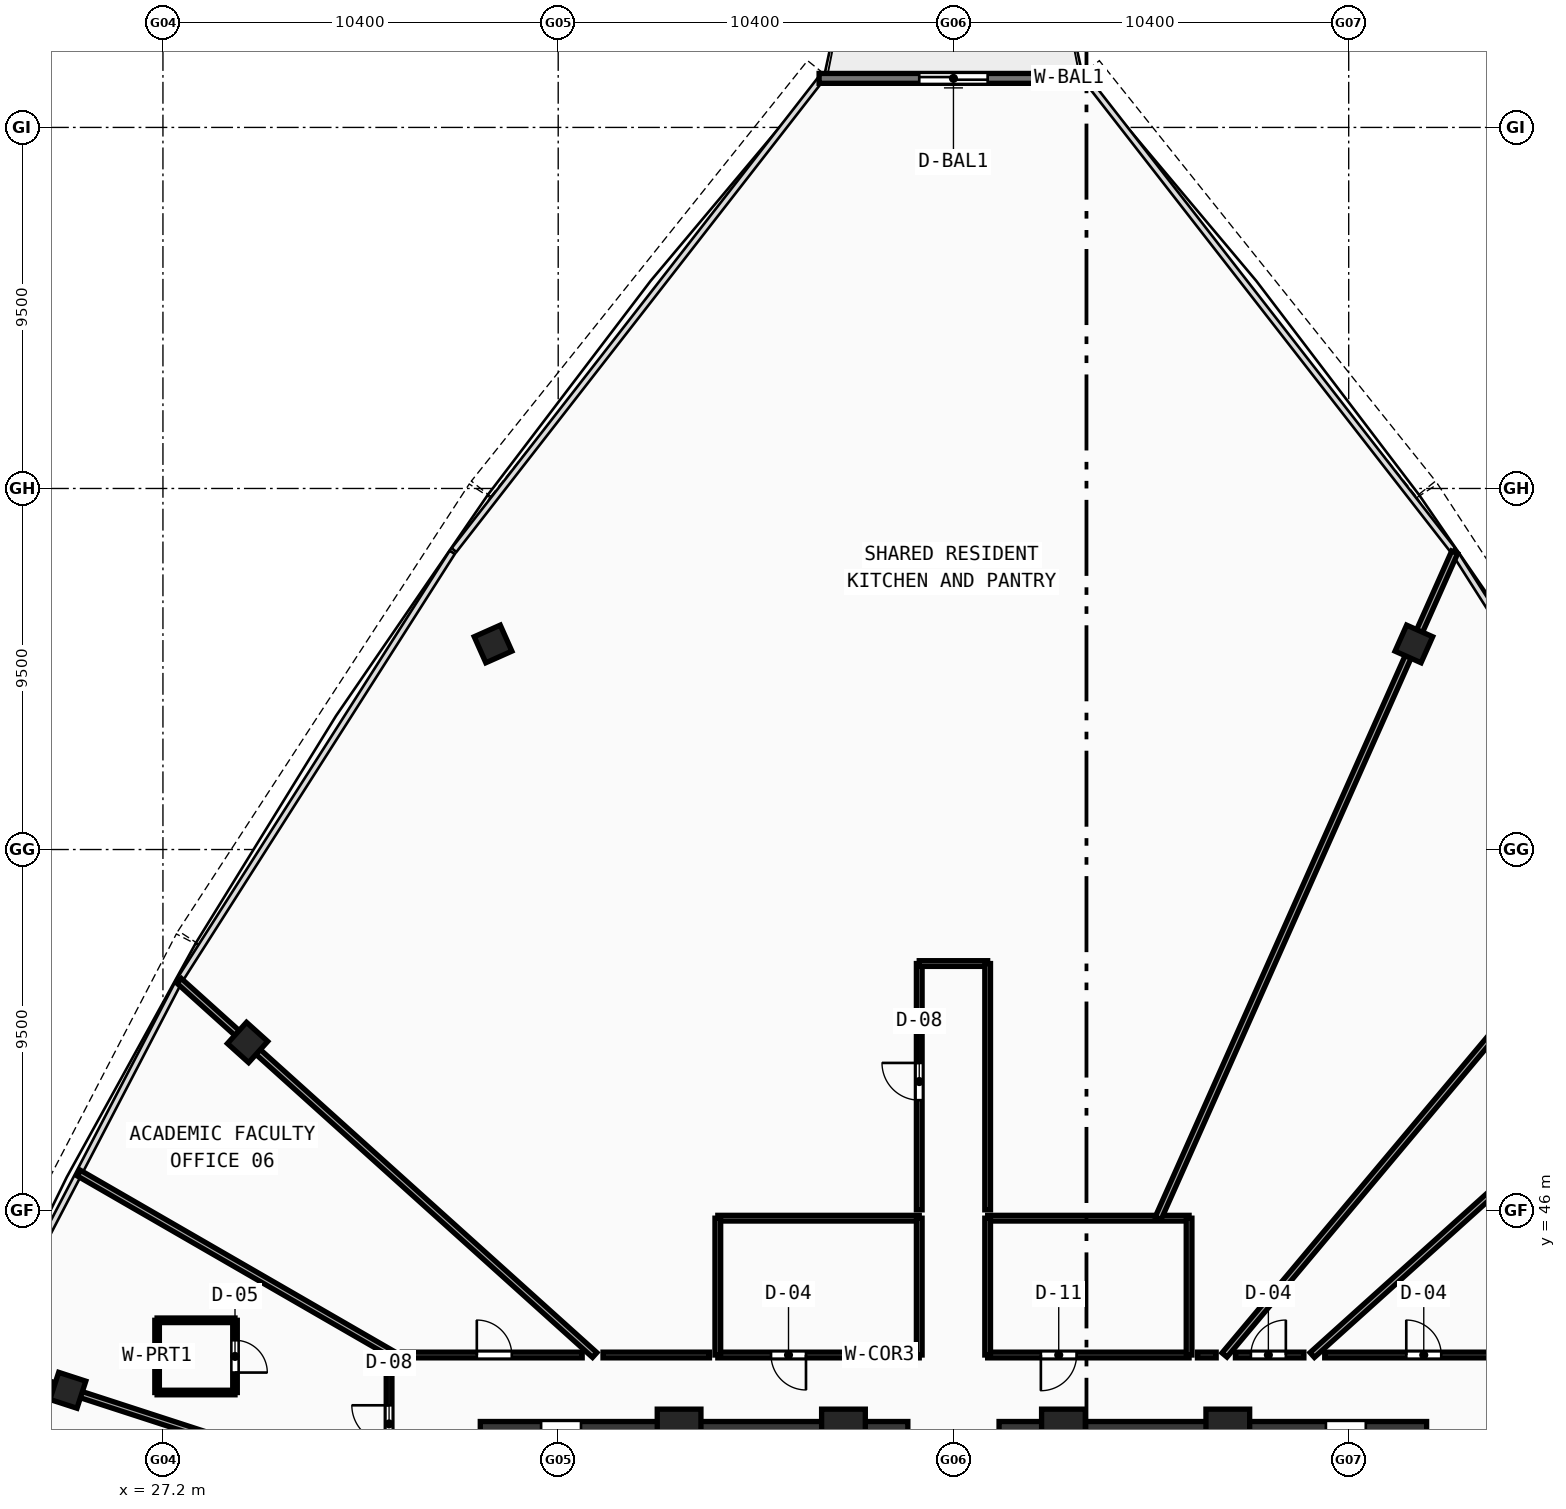
"""IFC4 building model, lengths in metres.
Left out: names, types, materials, properties, quantities, classifications, styles, units other than length and angle.
Written with IfcOpenShell. Run it as: python <this file> out.ifc"""

import sys

from ifc_helpers import new_model, si_unit, direction, frame, frame_2d, origin, origin_with_axes, origin_2d, place, context, subcontext, project, spatial, rectangle, hollow_rectangle, extrude, source, transform, mapped, element, fill, save


model = new_model("IFC4")
c1 = context("Model", 3, precision=1e-05, world=origin(), true_north=direction((0.0, 1.0)))
c2 = subcontext(c1, "Body", "Model", "MODEL_VIEW")
j1 = project(units=[si_unit("LENGTHUNIT", "METRE"), si_unit("PLANEANGLEUNIT", "RADIAN")], contexts=[c1])
p1 = place(None, origin())
s1 = spatial("IfcSite", under=j1, at=p1, CompositionType="ELEMENT")
p2 = place(p1, origin())
s2 = spatial("IfcBuilding", under=s1, at=p2, CompositionType="ELEMENT")
p3 = place(p2, frame((0.0, 0.0, 296.21)))
s3 = spatial("IfcBuildingStorey", under=s2, at=p3, CompositionType="ELEMENT", Elevation=296.21)
p4 = place(p3, frame((35.55, 40.2, 0.0), z_axis=(0.0, 0.0, 1.0), x_axis=(1.0, 0.0, 0.0)))
e1 = element("IfcWall", 1, at=p4, inside=s3, PredefinedType="SHEAR", context=c2, shape_type="SweptSolid", body=[
    extrude(rectangle(XDim=11.25, YDim=0.5, at=frame_2d((5.625, 0.0))), origin(), (0.0, 0.0, 1.0), 3.47),
])
p5 = place(p4, frame((1.6, 0.0, 0.0)))
e2 = element("IfcOpeningElement", 2, at=p5, cuts=e1, PredefinedType="OPENING", context=c2, shape_type="SweptSolid", body=[
    extrude(rectangle(XDim=1.05, YDim=2.1, at=frame_2d((0.525, 1.05))), frame((0.0, 0.26, 0.0), z_axis=(0.0, -1.0, 0.0), x_axis=(1.0, 0.0, 0.0)), (0.0, 0.0, 1.0), 0.52),
])
p6 = place(p3, frame((49.2, 40.2, 0.0), z_axis=(0.0, 0.0, 1.0), x_axis=(1.0, 0.0, 0.0)))
e3 = element("IfcWall", 3, at=p6, inside=s3, PredefinedType="SHEAR", context=c2, shape_type="SweptSolid", body=[
    extrude(rectangle(XDim=11.25, YDim=0.5, at=frame_2d((5.625, 0.0))), origin(), (0.0, 0.0, 1.0), 3.47),
])
p7 = place(p6, frame((8.6, 0.0, 0.0)))
e4 = element("IfcOpeningElement", 4, at=p7, cuts=e3, PredefinedType="OPENING", context=c2, shape_type="SweptSolid", body=[
    extrude(rectangle(XDim=1.05, YDim=2.1, at=frame_2d((0.525, 1.05))), frame((0.0, 0.26, 0.0), z_axis=(0.0, -1.0, 0.0), x_axis=(1.0, 0.0, 0.0)), (0.0, 0.0, 1.0), 0.52),
])
m1 = source(origin(), c2, "Body", "SweptSolid", [
    extrude(hollow_rectangle(XDim=1.15, YDim=1.15, WallThickness=0.048, at=origin_2d()), origin(), (0.0, 0.0, 1.0), 3.73),
])
for number, where, z_axis, x_axis in (
    (5, (55.219, 40.2, -0.26), (0.0, 0.0, 1.0), (1.0, 0.0, 0.0)),
    (6, (50.894, 40.2, -0.26), (0.0, 0.0, 1.0), (1.0, 0.0, 0.0)),
    (7, (45.106, 40.2, -0.26), (0.0, 0.0, 1.0), (1.0, 0.0, 0.0)),
    (8, (40.781, 40.2, -0.26), (0.0, 0.0, 1.0), (1.0, 0.0, 0.0)),
):
    element("IfcColumn", number, at=place(p3, frame(where, z_axis=z_axis, x_axis=x_axis)), inside=s3, PredefinedType="COLUMN", context=c2, shape_type="MappedRepresentation", body=[
        mapped(m1, transform((0.0, 0.0, 0.0), scale=1.0)),
    ])
m2 = source(origin(), c2, "Body", "SweptSolid", [
    extrude(hollow_rectangle(XDim=0.75, YDim=0.75, WallThickness=0.028, at=origin_2d()), origin(), (0.0, 0.0, 1.0), 3.73),
])
for number, where, z_axis, x_axis in (
    (9, (60.114, 60.909, -0.26), (0.0, 0.0, 1.0), (-0.914, 0.407, 0.0)),
    (10, (35.886, 60.909, -0.26), (0.0, 0.0, 1.0), (-0.914, -0.407, 0.0)),
    (11, (29.427, 50.424, -0.26), (0.0, 0.0, 1.0), (-0.669, -0.743, 0.0)),
    (12, (24.698, 41.271, -0.26), (0.0, 0.0, 1.0), (-0.309, -0.951, 0.0)),
):
    element("IfcColumn", number, at=place(p3, frame(where, z_axis=z_axis, x_axis=x_axis)), inside=s3, PredefinedType="COLUMN", context=c2, shape_type="MappedRepresentation", body=[
        mapped(m2, transform((0.0, 0.0, 0.0), scale=1.0)),
    ])
p8 = place(p3, frame((51.535, 75.79, 0.0), z_axis=(0.0, 0.0, 1.0), x_axis=(-1.0, 0.0, 0.0)))
e13 = element("IfcWall", 13, at=p8, inside=s3, PredefinedType="STANDARD", context=c2, shape_type="SweptSolid", body=[
    extrude(rectangle(XDim=7.07, YDim=0.26, at=frame_2d((3.535, 0.0))), origin(), (0.0, 0.0, 1.0), 3.47),
])
p9 = place(p8, frame((2.635, 0.0, 0.0)))
e14 = element("IfcOpeningElement", 14, at=p9, cuts=e13, PredefinedType="OPENING", context=c2, shape_type="SweptSolid", body=[
    extrude(rectangle(XDim=1.8, YDim=2.15, at=frame_2d((0.9, 1.075))), frame((0.0, 0.14, 0.0), z_axis=(0.0, -1.0, 0.0), x_axis=(1.0, 0.0, 0.0)), (0.0, 0.0, 1.0), 0.28),
])
p10 = place(p3, frame((41.8, 42.2, 0.0), z_axis=(0.0, 0.0, 1.0), x_axis=(1.0, 0.0, 0.0)))
e15 = element("IfcWall", 15, at=p10, inside=s3, PredefinedType="PARTITIONING", context=c2, shape_type="SweptSolid", body=[
    extrude(rectangle(XDim=5.3, YDim=0.15, at=frame_2d((2.65, 0.0))), origin(), (0.0, 0.0, 1.0), 2.87),
])
p11 = place(p10, frame((1.4, 0.0, 0.0)))
e16 = element("IfcOpeningElement", 16, at=p11, cuts=e15, PredefinedType="OPENING", context=c2, shape_type="SweptSolid", body=[
    extrude(rectangle(XDim=0.92, YDim=2.1, at=frame_2d((0.46, 1.05))), frame((0.0, 0.085, 0.0), z_axis=(0.0, -1.0, 0.0), x_axis=(1.0, 0.0, 0.0)), (0.0, 0.0, 1.0), 0.17),
])
p12 = place(p3, frame((41.8, 45.8, 0.0), z_axis=(0.0, 0.0, 1.0), x_axis=(1.0, 0.0, 0.0)))
e17 = element("IfcWall", 17, at=p12, inside=s3, PredefinedType="PARTITIONING", context=c2, shape_type="SweptSolid", body=[
    extrude(rectangle(XDim=5.3, YDim=0.15, at=frame_2d((2.65, 0.0))), origin(), (0.0, 0.0, 1.0), 2.87),
])
for number, where, z_axis, x_axis in (
    (18, (41.8, 42.2, 0.0), (0.0, 0.0, 1.0), (0.0, 1.0, 0.0)),
    (19, (47.1, 42.2, 0.0), (0.0, 0.0, 1.0), (0.0, 1.0, 0.0)),
):
    element("IfcWall", number, at=place(p3, frame(where, z_axis=z_axis, x_axis=x_axis)), inside=s3, PredefinedType="PARTITIONING", context=c2, shape_type="SweptSolid", body=[
        extrude(rectangle(XDim=3.6, YDim=0.15, at=frame_2d((1.8, 0.0))), origin(), (0.0, 0.0, 1.0), 3.47),
    ])
p13 = place(p3, frame((48.9, 42.2, 0.0), z_axis=(0.0, 0.0, 1.0), x_axis=(1.0, 0.0, 0.0)))
e20 = element("IfcWall", 20, at=p13, inside=s3, PredefinedType="PARTITIONING", context=c2, shape_type="SweptSolid", body=[
    extrude(rectangle(XDim=5.3, YDim=0.15, at=frame_2d((2.65, 0.0))), origin(), (0.0, 0.0, 1.0), 2.87),
])
p14 = place(p13, frame((1.4, 0.0, 0.0)))
e21 = element("IfcOpeningElement", 21, at=p14, cuts=e20, PredefinedType="OPENING", context=c2, shape_type="SweptSolid", body=[
    extrude(rectangle(XDim=0.94, YDim=2.1, at=frame_2d((0.47, 1.05))), frame((0.0, 0.085, 0.0), z_axis=(0.0, -1.0, 0.0), x_axis=(1.0, 0.0, 0.0)), (0.0, 0.0, 1.0), 0.17),
])
p15 = place(p3, frame((48.9, 45.8, 0.0), z_axis=(0.0, 0.0, 1.0), x_axis=(1.0, 0.0, 0.0)))
e22 = element("IfcWall", 22, at=p15, inside=s3, PredefinedType="PARTITIONING", context=c2, shape_type="SweptSolid", body=[
    extrude(rectangle(XDim=5.3, YDim=0.15, at=frame_2d((2.65, 0.0))), origin(), (0.0, 0.0, 1.0), 2.87),
])
for number, where, z_axis, x_axis in (
    (23, (48.9, 42.2, 0.0), (0.0, 0.0, 1.0), (0.0, 1.0, 0.0)),
    (24, (54.2, 42.2, 0.0), (0.0, 0.0, 1.0), (0.0, 1.0, 0.0)),
):
    element("IfcWall", number, at=place(p3, frame(where, z_axis=z_axis, x_axis=x_axis)), inside=s3, PredefinedType="PARTITIONING", context=c2, shape_type="SweptSolid", body=[
        extrude(rectangle(XDim=3.6, YDim=0.15, at=frame_2d((1.8, 0.0))), origin(), (0.0, 0.0, 1.0), 3.47),
    ])
p16 = place(p3, frame((57.44, 42.2, 0.0), z_axis=(0.0, 0.0, 1.0), x_axis=(0.743145593795, 0.669129753055, 0.0)))
e25 = element("IfcWall", 25, at=p16, inside=s3, PredefinedType="PARTITIONING", context=c2, shape_type="SweptSolid", body=[
    extrude(rectangle(XDim=14.711, YDim=0.17, at=frame_2d((7.355, 0.0))), origin(), (0.0, 0.0, 1.0), 2.87),
])
p17 = place(p3, frame((55.132, 42.2, 0.0), z_axis=(0.0, 0.0, 1.0), x_axis=(0.642779182264, 0.766051514487, 0.0)))
e26 = element("IfcWall", 26, at=p17, inside=s3, PredefinedType="PARTITIONING", context=c2, shape_type="SweptSolid", body=[
    extrude(rectangle(XDim=17.254, YDim=0.17, at=frame_2d((8.627, 0.0))), origin(), (0.0, 0.0, 1.0), 2.87),
])
p18 = place(p3, frame((53.387, 45.8, 0.0), z_axis=(0.0, 0.0, 1.0), x_axis=(0.406740781751, 0.913543614975, 0.0)))
e27 = element("IfcWall", 27, at=p18, inside=s3, PredefinedType="PARTITIONING", context=c2, shape_type="SweptSolid", body=[
    extrude(rectangle(XDim=19.177, YDim=0.17, at=frame_2d((9.589, 0.0))), origin(), (0.0, 0.0, 1.0), 2.87),
])
p19 = place(p3, frame((38.56, 42.2, 0.0), z_axis=(0.0, 0.0, 1.0), x_axis=(-0.743145593795, 0.669129753055, 0.0)))
e28 = element("IfcWall", 28, at=p19, inside=s3, PredefinedType="PARTITIONING", context=c2, shape_type="SweptSolid", body=[
    extrude(rectangle(XDim=14.711, YDim=0.17, at=frame_2d((7.355, 0.0))), origin(), (0.0, 0.0, 1.0), 2.87),
])
p20 = place(p3, frame((33.278, 42.2, 0.0), z_axis=(0.0, 0.0, 1.0), x_axis=(-0.866033492747, 0.499985989244, 0.0)))
e29 = element("IfcWall", 29, at=p20, inside=s3, PredefinedType="PARTITIONING", context=c2, shape_type="SweptSolid", body=[
    extrude(rectangle(XDim=9.57, YDim=0.17, at=frame_2d((4.785, 0.0))), origin(), (0.0, 0.0, 1.0), 2.87),
])
p21 = place(p3, frame((33.15, 38.525, 0.0), z_axis=(0.0, 0.0, 1.0), x_axis=(-0.951060099206, 0.309005967092, 0.0)))
e30 = element("IfcWall", 30, at=p21, inside=s3, PredefinedType="PARTITIONING", context=c2, shape_type="SweptSolid", body=[
    extrude(rectangle(XDim=11.302, YDim=0.17, at=frame_2d((5.651, 0.0))), origin(), (0.0, 0.0, 1.0), 2.87),
])
p22 = place(p3, frame((33.15, 38.756, 0.0), z_axis=(0.0, 0.0, 1.0), x_axis=(0.0, 1.0, 0.0)))
e31 = element("IfcWall", 31, at=p22, inside=s3, PredefinedType="PARTITIONING", context=c2, shape_type="SweptSolid", body=[
    extrude(rectangle(XDim=3.263, YDim=0.15, at=frame_2d((1.632, 0.0))), origin(), (0.0, 0.0, 1.0), 3.12),
])
p23 = place(p22, frame((1.14, 0.0, 0.0)))
e32 = element("IfcOpeningElement", 32, at=p23, cuts=e31, PredefinedType="OPENING", context=c2, shape_type="SweptSolid", body=[
    extrude(rectangle(XDim=0.98, YDim=2.12, at=frame_2d((0.49, 1.06))), frame((0.0, 0.085, 0.0), z_axis=(0.0, -1.0, 0.0), x_axis=(1.0, 0.0, 0.0)), (0.0, 0.0, 1.0), 0.17),
])
p24 = place(p3, frame((33.497, 42.2, 0.0), z_axis=(0.0, 0.0, 1.0), x_axis=(1.0, 0.0, 0.0)))
e33 = element("IfcWall", 33, at=p24, inside=s3, PredefinedType="PARTITIONING", context=c2, shape_type="SweptSolid", body=[
    extrude(rectangle(XDim=4.734, YDim=0.15, at=frame_2d((2.367, 0.0))), origin(), (0.0, 0.0, 1.0), 3.12),
])
p25 = place(p24, frame((1.961, 0.0, 0.0)))
e34 = element("IfcOpeningElement", 34, at=p25, cuts=e33, PredefinedType="OPENING", context=c2, shape_type="SweptSolid", body=[
    extrude(rectangle(XDim=0.92, YDim=2.1, at=frame_2d((0.46, 1.05))), frame((0.0, 0.085, 0.0), z_axis=(0.0, -1.0, 0.0), x_axis=(1.0, 0.0, 0.0)), (0.0, 0.0, 1.0), 0.17),
])
p26 = place(p3, frame((38.78, 42.2, 0.0), z_axis=(0.0, 0.0, 1.0), x_axis=(1.0, 0.0, 0.0)))
e35 = element("IfcWall", 35, at=p26, inside=s3, PredefinedType="PARTITIONING", context=c2, shape_type="SweptSolid", body=[
    extrude(rectangle(XDim=2.801, YDim=0.15, at=frame_2d((1.4, 0.0))), origin(), (0.0, 0.0, 1.0), 2.87),
])
p27 = place(p3, frame((47.1, 46.02, 0.0), z_axis=(0.0, 0.0, 1.0), x_axis=(0.0, 1.0, 0.0)))
e36 = element("IfcWall", 36, at=p27, inside=s3, PredefinedType="PARTITIONING", context=c2, shape_type="SweptSolid", body=[
    extrude(rectangle(XDim=6.48, YDim=0.15, at=frame_2d((3.24, 0.0))), origin(), (0.0, 0.0, 1.0), 3.12),
])
p28 = place(p27, frame((2.885, 0.0, 0.0)))
e37 = element("IfcOpeningElement", 37, at=p28, cuts=e36, PredefinedType="OPENING", context=c2, shape_type="SweptSolid", body=[
    extrude(rectangle(XDim=0.98, YDim=2.12, at=frame_2d((0.49, 1.06))), frame((0.0, 0.085, 0.0), z_axis=(0.0, -1.0, 0.0), x_axis=(1.0, 0.0, 0.0)), (0.0, 0.0, 1.0), 0.17),
])
p29 = place(p3, frame((47.1, 52.5, 0.0), z_axis=(0.0, 0.0, 1.0), x_axis=(1.0, 0.0, 0.0)))
e38 = element("IfcWall", 38, at=p29, inside=s3, PredefinedType="PARTITIONING", context=c2, shape_type="SweptSolid", body=[
    extrude(rectangle(XDim=1.8, YDim=0.15, at=frame_2d((0.9, 0.0))), origin(), (0.0, 0.0, 1.0), 3.47),
])
p30 = place(p3, frame((48.9, 52.5, 0.0), z_axis=(0.0, 0.0, 1.0), x_axis=(0.0, -1.0, 0.0)))
e39 = element("IfcWall", 39, at=p30, inside=s3, PredefinedType="PARTITIONING", context=c2, shape_type="SweptSolid", body=[
    extrude(rectangle(XDim=6.48, YDim=0.15, at=frame_2d((3.24, 0.0))), origin(), (0.0, 0.0, 1.0), 3.12),
])
p31 = place(p3, frame((54.42, 42.2, 0.0), z_axis=(0.0, 0.0, 1.0), x_axis=(1.0, 0.0, 0.0)))
e40 = element("IfcWall", 40, at=p31, inside=s3, PredefinedType="PARTITIONING", context=c2, shape_type="SweptSolid", body=[
    extrude(rectangle(XDim=0.492, YDim=0.15, at=frame_2d((0.246, 0.0))), origin(), (0.0, 0.0, 1.0), 3.47),
])
p32 = place(p3, frame((55.419, 42.2, 0.0), z_axis=(0.0, 0.0, 1.0), x_axis=(1.0, 0.0, 0.0)))
e41 = element("IfcWall", 41, at=p32, inside=s3, PredefinedType="PARTITIONING", context=c2, shape_type="SweptSolid", body=[
    extrude(rectangle(XDim=1.801, YDim=0.15, at=frame_2d((0.9, 0.0))), origin(), (0.0, 0.0, 1.0), 2.87),
])
p33 = place(p32, frame((0.407, 0.0, 0.0)))
e42 = element("IfcOpeningElement", 42, at=p33, cuts=e41, PredefinedType="OPENING", context=c2, shape_type="SweptSolid", body=[
    extrude(rectangle(XDim=0.92, YDim=2.1, at=frame_2d((0.46, 1.05))), frame((0.0, 0.085, 0.0), z_axis=(0.0, -1.0, 0.0), x_axis=(1.0, 0.0, 0.0)), (0.0, 0.0, 1.0), 0.17),
])
p34 = place(p3, frame((57.769, 42.2, 0.0), z_axis=(0.0, 0.0, 1.0), x_axis=(1.0, 0.0, 0.0)))
e43 = element("IfcWall", 43, at=p34, inside=s3, PredefinedType="PARTITIONING", context=c2, shape_type="SweptSolid", body=[
    extrude(rectangle(XDim=5.081, YDim=0.15, at=frame_2d((2.541, 0.0))), origin(), (0.0, 0.0, 1.0), 3.12),
])
p35 = place(p34, frame((2.146, 0.0, 0.0)))
e44 = element("IfcOpeningElement", 44, at=p35, cuts=e43, PredefinedType="OPENING", context=c2, shape_type="SweptSolid", body=[
    extrude(rectangle(XDim=0.92, YDim=2.1, at=frame_2d((0.46, 1.05))), frame((0.0, 0.085, 0.0), z_axis=(0.0, -1.0, 0.0), x_axis=(1.0, 0.0, 0.0)), (0.0, 0.0, 1.0), 0.17),
])
p36 = place(p3, frame((27.046, 41.213, 0.0), z_axis=(0.0, 0.0, 1.0), x_axis=(1.0, 0.0, 0.0)))
e45 = element("IfcWall", 45, at=p36, inside=s3, PredefinedType="PARTITIONING", context=c2, shape_type="SweptSolid", body=[
    extrude(rectangle(XDim=2.05, YDim=0.12, at=frame_2d((1.025, 0.0))), origin(), (0.0, 0.0, 1.0), 3.12),
])
p37 = place(p3, frame((29.096, 41.213, 0.0), z_axis=(0.0, 0.0, 1.0), x_axis=(0.0, 1.0, 0.0)))
e46 = element("IfcWall", 46, at=p37, inside=s3, PredefinedType="PARTITIONING", context=c2, shape_type="SweptSolid", body=[
    extrude(rectangle(XDim=1.9, YDim=0.12, at=frame_2d((0.95, 0.0))), origin(), (0.0, 0.0, 1.0), 3.12),
])
p38 = place(p37, frame((0.525, 0.0, 0.0)))
e47 = element("IfcOpeningElement", 47, at=p38, cuts=e46, PredefinedType="OPENING", context=c2, shape_type="SweptSolid", body=[
    extrude(rectangle(XDim=0.85, YDim=2.1, at=frame_2d((0.425, 1.05))), frame((0.0, 0.07, 0.0), z_axis=(0.0, -1.0, 0.0), x_axis=(1.0, 0.0, 0.0)), (0.0, 0.0, 1.0), 0.14),
])
p39 = place(p3, frame((29.096, 43.113, 0.0), z_axis=(0.0, 0.0, 1.0), x_axis=(-1.0, 0.0, 0.0)))
e48 = element("IfcWall", 48, at=p39, inside=s3, PredefinedType="PARTITIONING", context=c2, shape_type="SweptSolid", body=[
    extrude(rectangle(XDim=2.05, YDim=0.12, at=frame_2d((1.025, 0.0))), origin(), (0.0, 0.0, 1.0), 3.47),
])
p40 = place(p3, frame((27.046, 43.113, 0.0), z_axis=(0.0, 0.0, 1.0), x_axis=(0.0, -1.0, 0.0)))
e49 = element("IfcWall", 49, at=p40, inside=s3, PredefinedType="PARTITIONING", context=c2, shape_type="SweptSolid", body=[
    extrude(rectangle(XDim=1.9, YDim=0.12, at=frame_2d((0.95, 0.0))), origin(), (0.0, 0.0, 1.0), 3.47),
])
m3 = source(origin(), c2, "Body", "SweptSolid", [
    extrude(rectangle(XDim=1.8, YDim=2.15, at=frame_2d((0.9, 1.075))), frame((0.0, 0.025, 0.0), z_axis=(0.0, -1.0, 0.0), x_axis=(1.0, 0.0, 0.0)), (0.0, 0.0, 1.0), 0.05),
])
p41 = place(p9, origin_with_axes())
e50 = element("IfcDoor", 50, at=p41, inside=s3, OperationType="DOUBLE_DOOR_SLIDING", PredefinedType="DOOR", context=c2, shape_type="MappedRepresentation", body=[
    mapped(m3, transform((0.0, 0.0, 0.0), scale=1.0)),
])
fill(e14, e50)
m4 = source(origin(), c2, "Body", "SweptSolid", [
    extrude(rectangle(XDim=0.92, YDim=2.1, at=frame_2d((0.46, 1.05))), frame((0.0, 0.025, 0.0), z_axis=(0.0, -1.0, 0.0), x_axis=(1.0, 0.0, 0.0)), (0.0, 0.0, 1.0), 0.05),
])
p42 = place(p11, frame((0.92, 0.0, 0.0), z_axis=(0.0, 0.0, 1.0), x_axis=(-1.0, 0.0, 0.0)))
e51 = element("IfcDoor", 51, at=p42, inside=s3, OperationType="SINGLE_SWING_LEFT", PredefinedType="DOOR", context=c2, shape_type="MappedRepresentation", body=[
    mapped(m4, transform((0.0, 0.0, 0.0), scale=1.0)),
])
fill(e16, e51)
m5 = source(origin(), c2, "Body", "SweptSolid", [
    extrude(rectangle(XDim=0.94, YDim=2.1, at=frame_2d((0.47, 1.05))), frame((0.0, 0.025, 0.0), z_axis=(0.0, -1.0, 0.0), x_axis=(1.0, 0.0, 0.0)), (0.0, 0.0, 1.0), 0.05),
])
p43 = place(p14, frame((0.94, 0.0, 0.0), z_axis=(0.0, 0.0, 1.0), x_axis=(-1.0, 0.0, 0.0)))
e52 = element("IfcDoor", 52, at=p43, inside=s3, OperationType="SINGLE_SWING_RIGHT", PredefinedType="DOOR", context=c2, shape_type="MappedRepresentation", body=[
    mapped(m5, transform((0.0, 0.0, 0.0), scale=1.0)),
])
fill(e21, e52)
p44 = place(p35, origin_with_axes())
e53 = element("IfcDoor", 53, at=p44, inside=s3, OperationType="SINGLE_SWING_LEFT", PredefinedType="DOOR", context=c2, shape_type="MappedRepresentation", body=[
    mapped(m4, transform((0.0, 0.0, 0.0), scale=1.0)),
])
fill(e44, e53)
p45 = place(p33, origin_with_axes())
e54 = element("IfcDoor", 54, at=p45, inside=s3, OperationType="SINGLE_SWING_RIGHT", PredefinedType="DOOR", context=c2, shape_type="MappedRepresentation", body=[
    mapped(m4, transform((0.0, 0.0, 0.0), scale=1.0)),
])
fill(e42, e54)
m6 = source(origin(), c2, "Body", "SweptSolid", [
    extrude(rectangle(XDim=0.98, YDim=2.12, at=frame_2d((0.49, 1.06))), frame((0.0, 0.025, 0.0), z_axis=(0.0, -1.0, 0.0), x_axis=(1.0, 0.0, 0.0)), (0.0, 0.0, 1.0), 0.05),
])
p46 = place(p28, origin_with_axes())
e55 = element("IfcDoor", 55, at=p46, inside=s3, OperationType="SINGLE_SWING_RIGHT", PredefinedType="DOOR", context=c2, shape_type="MappedRepresentation", body=[
    mapped(m6, transform((0.0, 0.0, 0.0), scale=1.0)),
])
fill(e37, e55)
p47 = place(p25, origin_with_axes())
e56 = element("IfcDoor", 56, at=p47, inside=s3, OperationType="SINGLE_SWING_LEFT", PredefinedType="DOOR", context=c2, shape_type="MappedRepresentation", body=[
    mapped(m4, transform((0.0, 0.0, 0.0), scale=1.0)),
])
fill(e34, e56)
p48 = place(p23, origin_with_axes())
e57 = element("IfcDoor", 57, at=p48, inside=s3, OperationType="SINGLE_SWING_RIGHT", PredefinedType="DOOR", context=c2, shape_type="MappedRepresentation", body=[
    mapped(m6, transform((0.0, 0.0, 0.0), scale=1.0)),
])
fill(e32, e57)
m7 = source(origin(), c2, "Body", "SweptSolid", [
    extrude(rectangle(XDim=0.85, YDim=2.1, at=frame_2d((0.425, 1.05))), frame((0.0, 0.025, 0.0), z_axis=(0.0, -1.0, 0.0), x_axis=(1.0, 0.0, 0.0)), (0.0, 0.0, 1.0), 0.05),
])
p49 = place(p38, frame((0.85, 0.0, 0.0), z_axis=(0.0, 0.0, 1.0), x_axis=(-1.0, 0.0, 0.0)))
e58 = element("IfcDoor", 58, at=p49, inside=s3, OperationType="SINGLE_SWING_RIGHT", PredefinedType="DOOR", context=c2, shape_type="MappedRepresentation", body=[
    mapped(m7, transform((0.0, 0.0, 0.0), scale=1.0)),
])
fill(e47, e58)
save(model, sys.argv[1])
